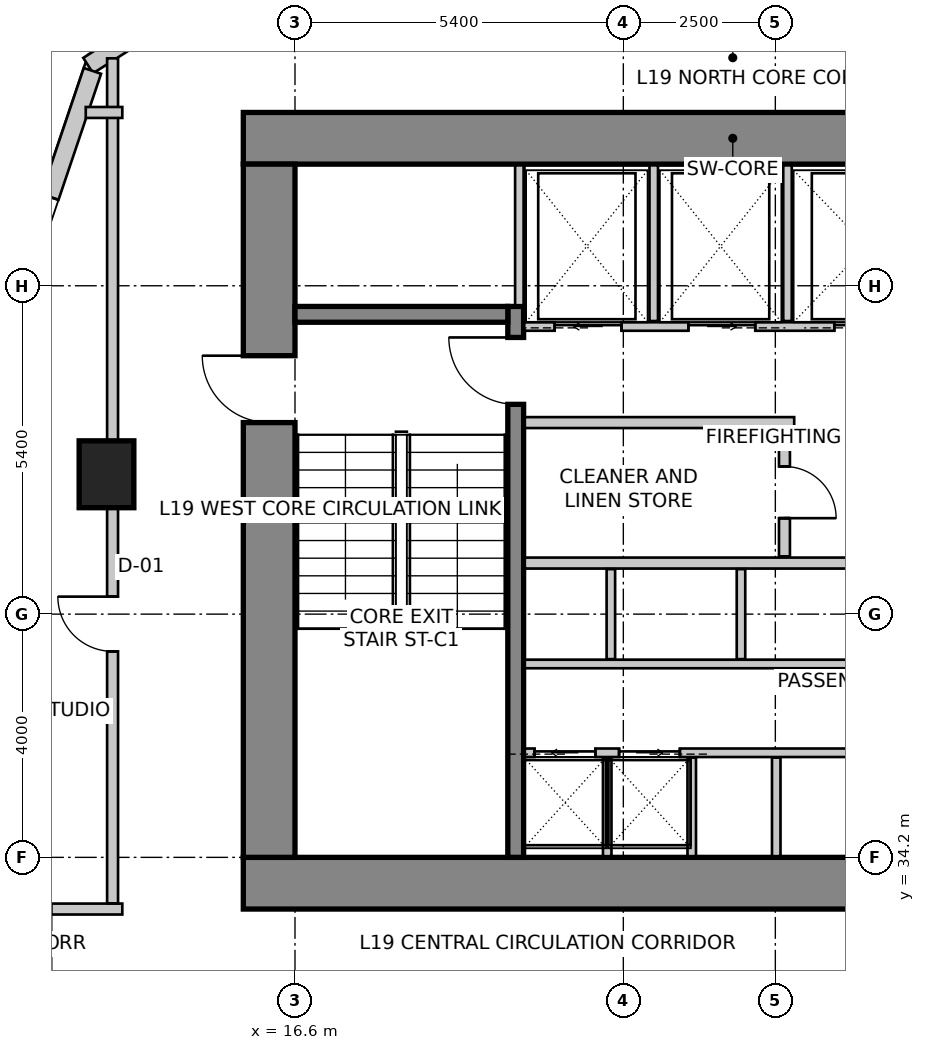
"""IFC4 building model, lengths in metres.
Left out: names, types, materials, properties, quantities, classifications, styles, units other than length and angle.
Written with IfcOpenShell. Run it as: python <this file> out.ifc"""

import sys

from ifc_helpers import new_model, si_unit, direction, frame, frame_2d, origin, origin_2d, place, context, subcontext, project, spatial, rectangle, extrude, source, transform, mapped, element, fill, save


model = new_model("IFC4")
c1 = context("Model", 3, precision=1e-05, world=origin(), true_north=direction((0.0, 1.0)))
c2 = subcontext(c1, "Body", "Model", "MODEL_VIEW")
j1 = project(units=[si_unit("LENGTHUNIT", "METRE"), si_unit("PLANEANGLEUNIT", "RADIAN")], contexts=[c1])
p1 = place(None, origin())
s1 = spatial("IfcSite", under=j1, at=p1, CompositionType="ELEMENT")
p2 = place(p1, origin())
s2 = spatial("IfcBuilding", under=s1, at=p2, CompositionType="ELEMENT")
p3 = place(p2, frame((0.0, 0.0, 79.0)))
s3 = spatial("IfcBuildingStorey", under=s2, at=p3, CompositionType="ELEMENT", Elevation=79.0)
p4 = place(p3, frame((15.75, 46.025, 0.0), z_axis=(0.0, 0.0, 1.0), x_axis=(1.0, 0.0, 0.0)))
e1 = element("IfcWall", 1, at=p4, inside=s3, PredefinedType="SHEAR", context=c2, shape_type="SweptSolid", body=[
    extrude(rectangle(XDim=16.1, YDim=0.85, at=frame_2d((8.05, 0.0))), origin(), (0.0, 0.0, 1.0), 4.0),
])
p5 = place(p3, frame((15.75, 33.775, 0.0), z_axis=(0.0, 0.0, 1.0), x_axis=(1.0, 0.0, 0.0)))
e2 = element("IfcWall", 2, at=p5, inside=s3, PredefinedType="SHEAR", context=c2, shape_type="SweptSolid", body=[
    extrude(rectangle(XDim=16.1, YDim=0.85, at=frame_2d((8.05, 0.0))), origin(), (0.0, 0.0, 1.0), 4.0),
])
m1 = source(origin(), c2, "Body", "SweptSolid", [
    extrude(rectangle(XDim=1.3, YDim=2.15, at=frame_2d((0.65, 1.075))), frame((0.0, 0.435, 0.0), z_axis=(0.0, -1.0, 0.0), x_axis=(1.0, 0.0, 0.0)), (0.0, 0.0, 1.0), 0.87),
])
p6 = place(p5, frame((10.18, 0.0, 0.0)))
e3 = element("IfcOpeningElement", 3, at=p6, cuts=e2, PredefinedType="OPENING", context=c2, shape_type="MappedRepresentation", body=[
    mapped(m1, transform((0.0, 0.0, 0.0), scale=1.0)),
])
p7 = place(p3, frame((16.175, 34.2, 0.0), z_axis=(0.0, 0.0, 1.0), x_axis=(0.0, 1.0, 0.0)))
e4 = element("IfcWall", 4, at=p7, inside=s3, PredefinedType="SHEAR", context=c2, shape_type="SweptSolid", body=[
    extrude(rectangle(XDim=11.4, YDim=0.85, at=frame_2d((5.7, 0.0))), origin(), (0.0, 0.0, 1.0), 4.0),
])
m2 = source(origin(), c2, "Body", "SweptSolid", [
    extrude(rectangle(XDim=1.1, YDim=2.15, at=frame_2d((0.55, 1.075))), frame((0.0, 0.435, 0.0), z_axis=(0.0, -1.0, 0.0), x_axis=(1.0, 0.0, 0.0)), (0.0, 0.0, 1.0), 0.87),
])
p8 = place(p7, frame((7.15, 0.0, 0.0)))
e5 = element("IfcOpeningElement", 5, at=p8, cuts=e4, PredefinedType="OPENING", context=c2, shape_type="MappedRepresentation", body=[
    mapped(m2, transform((0.0, 0.0, 0.0), scale=1.0)),
])
p9 = place(p3, frame((20.23, 34.2, 0.0), z_axis=(0.0, 0.0, 1.0), x_axis=(0.0, 1.0, 0.0)))
e6 = element("IfcWall", 6, at=p9, inside=s3, PredefinedType="SHEAR", context=c2, shape_type="SweptSolid", body=[
    extrude(rectangle(XDim=9.06, YDim=0.26, at=frame_2d((4.53, 0.0))), origin(), (0.0, 0.0, 1.0), 4.0),
])
m3 = source(origin(), c2, "Body", "SweptSolid", [
    extrude(rectangle(XDim=1.1, YDim=2.15, at=frame_2d((0.55, 1.075))), frame((0.0, 0.14, 0.0), z_axis=(0.0, -1.0, 0.0), x_axis=(1.0, 0.0, 0.0)), (0.0, 0.0, 1.0), 0.28),
])
p10 = place(p9, frame((7.45, 0.0, 0.0)))
e7 = element("IfcOpeningElement", 7, at=p10, cuts=e6, PredefinedType="OPENING", context=c2, shape_type="MappedRepresentation", body=[
    mapped(m3, transform((0.0, 0.0, 0.0), scale=1.0)),
])
p11 = place(p3, frame((16.6, 43.13, 0.0), z_axis=(0.0, 0.0, 1.0), x_axis=(1.0, 0.0, 0.0)))
e8 = element("IfcWall", 8, at=p11, inside=s3, PredefinedType="SHEAR", context=c2, shape_type="SweptSolid", body=[
    extrude(rectangle(XDim=3.5, YDim=0.26, at=frame_2d((1.75, 0.0))), origin(), (0.0, 0.0, 1.0), 4.0),
])
m4 = source(origin(), c2, "Body", "SweptSolid", [
    extrude(rectangle(XDim=0.9, YDim=1.1, at=origin_2d()), origin(), (0.0, 0.0, 1.0), 4.0),
])
p12 = place(p3, frame((13.5, 40.5, 0.0), z_axis=(0.0, 0.0, 1.0), x_axis=(1.0, 0.0, 0.0)))
e9 = element("IfcColumn", 9, at=p12, inside=s3, PredefinedType="COLUMN", context=c2, shape_type="MappedRepresentation", body=[
    mapped(m4, transform((0.0, 0.0, 0.0), scale=1.0)),
])
p13 = place(p3, frame((53.961, 47.417, 0.0), z_axis=(0.0, 0.0, 1.0), x_axis=(-0.985865713455, 0.167537443678, 0.0)))
e10 = element("IfcWall", 10, at=p13, inside=s3, PredefinedType="SOLIDWALL", context=c2, shape_type="SweptSolid", body=[
    extrude(rectangle(XDim=32.537, YDim=0.3, at=frame_2d((16.269, 0.0))), origin(), (0.0, 0.0, 1.0), 3.75),
])
m5 = source(origin(), c2, "Body", "SweptSolid", [
    extrude(rectangle(XDim=2.1, YDim=2.0, at=frame_2d((1.05, 1.0))), frame((0.0, 0.16, 0.0), z_axis=(0.0, -1.0, 0.0), x_axis=(1.0, 0.0, 0.0)), (0.0, 0.0, 1.0), 0.32),
])
p14 = place(p13, frame((0.525, 0.0, 0.85)))
e11 = element("IfcOpeningElement", 11, at=p14, cuts=e10, PredefinedType="OPENING", context=c2, shape_type="MappedRepresentation", body=[
    mapped(m5, transform((0.0, 0.0, 0.0), scale=1.0)),
])
m6 = source(origin(), c2, "Body", "SweptSolid", [
    extrude(rectangle(XDim=2.4, YDim=2.2, at=frame_2d((1.2, 1.1))), frame((0.0, 0.16, 0.0), z_axis=(0.0, -1.0, 0.0), x_axis=(1.0, 0.0, 0.0)), (0.0, 0.0, 1.0), 0.32),
])
p15 = place(p13, frame((4.022, 0.0, 0.85)))
e12 = element("IfcOpeningElement", 12, at=p15, cuts=e10, PredefinedType="OPENING", context=c2, shape_type="MappedRepresentation", body=[
    mapped(m6, transform((0.0, 0.0, 0.0), scale=1.0)),
])
p16 = place(p13, frame((8.368, 0.0, 0.85)))
e13 = element("IfcOpeningElement", 13, at=p16, cuts=e10, PredefinedType="OPENING", context=c2, shape_type="MappedRepresentation", body=[
    mapped(m6, transform((0.0, 0.0, 0.0), scale=1.0)),
])
p17 = place(p13, frame((12.713, 0.0, 0.85)))
e14 = element("IfcOpeningElement", 14, at=p17, cuts=e10, PredefinedType="OPENING", context=c2, shape_type="MappedRepresentation", body=[
    mapped(m6, transform((0.0, 0.0, 0.0), scale=1.0)),
])
p18 = place(p13, frame((18.56, 0.0, 0.85)))
e15 = element("IfcOpeningElement", 15, at=p18, cuts=e10, PredefinedType="OPENING", context=c2, shape_type="MappedRepresentation", body=[
    mapped(m6, transform((0.0, 0.0, 0.0), scale=1.0)),
])
p19 = place(p13, frame((25.095, 0.0, 0.85)))
e16 = element("IfcOpeningElement", 16, at=p19, cuts=e10, PredefinedType="OPENING", context=c2, shape_type="MappedRepresentation", body=[
    mapped(m6, transform((0.0, 0.0, 0.0), scale=1.0)),
])
p20 = place(p13, frame((29.595, 0.0, 0.85)))
e17 = element("IfcOpeningElement", 17, at=p20, cuts=e10, PredefinedType="OPENING", context=c2, shape_type="MappedRepresentation", body=[
    mapped(m6, transform((0.0, 0.0, 0.0), scale=1.0)),
])
p21 = place(p3, frame((21.875, 52.742, 0.0), z_axis=(0.0, 0.0, 1.0), x_axis=(-0.843662465249, -0.536873956092, 0.0)))
e18 = element("IfcWall", 18, at=p21, inside=s3, PredefinedType="SOLIDWALL", context=c2, shape_type="SweptSolid", body=[
    extrude(rectangle(XDim=10.284, YDim=0.3, at=frame_2d((5.142, 0.0))), origin(), (0.0, 0.0, 1.0), 3.75),
])
m7 = source(origin(), c2, "Body", "SweptSolid", [
    extrude(rectangle(XDim=1.2, YDim=1.6, at=frame_2d((0.6, 0.8))), frame((0.0, 0.16, 0.0), z_axis=(0.0, -1.0, 0.0), x_axis=(1.0, 0.0, 0.0)), (0.0, 0.0, 1.0), 0.32),
])
p22 = place(p21, frame((0.479, 0.0, 0.85)))
e19 = element("IfcOpeningElement", 19, at=p22, cuts=e18, PredefinedType="OPENING", context=c2, shape_type="MappedRepresentation", body=[
    mapped(m7, transform((0.0, 0.0, 0.0), scale=1.0)),
])
m8 = source(origin(), c2, "Body", "SweptSolid", [
    extrude(rectangle(XDim=2.8, YDim=2.4, at=frame_2d((1.4, 1.2))), frame((0.0, 0.16, 0.0), z_axis=(0.0, -1.0, 0.0), x_axis=(1.0, 0.0, 0.0)), (0.0, 0.0, 1.0), 0.32),
])
p23 = place(p21, frame((3.342, 0.0, 0.85)))
e20 = element("IfcOpeningElement", 20, at=p23, cuts=e18, PredefinedType="OPENING", context=c2, shape_type="MappedRepresentation", body=[
    mapped(m8, transform((0.0, 0.0, 0.0), scale=1.0)),
])
m9 = source(origin(), c2, "Body", "SweptSolid", [
    extrude(rectangle(XDim=1.8, YDim=2.1, at=frame_2d((0.9, 1.05))), frame((0.0, 0.16, 0.0), z_axis=(0.0, -1.0, 0.0), x_axis=(1.0, 0.0, 0.0)), (0.0, 0.0, 1.0), 0.32),
])
p24 = place(p21, frame((7.753, 0.0, 0.85)))
e21 = element("IfcOpeningElement", 21, at=p24, cuts=e18, PredefinedType="OPENING", context=c2, shape_type="MappedRepresentation", body=[
    mapped(m9, transform((0.0, 0.0, 0.0), scale=1.0)),
])
p25 = place(p3, frame((13.269, 47.134, 0.0), z_axis=(0.0, 0.0, 1.0), x_axis=(-0.319920423265, -0.947444416722, 0.0)))
e22 = element("IfcWall", 22, at=p25, inside=s3, PredefinedType="SOLIDWALL", context=c2, shape_type="SweptSolid", body=[
    extrude(rectangle(XDim=16.135, YDim=0.3, at=frame_2d((8.067, 0.0))), origin(), (0.0, 0.0, 1.0), 3.75),
])
p26 = place(p25, frame((2.188, 0.0, 0.85)))
e23 = element("IfcOpeningElement", 23, at=p26, cuts=e22, PredefinedType="OPENING", context=c2, shape_type="MappedRepresentation", body=[
    mapped(m6, transform((0.0, 0.0, 0.0), scale=1.0)),
])
p27 = place(p25, frame((6.959, 0.0, 0.85)))
e24 = element("IfcOpeningElement", 24, at=p27, cuts=e22, PredefinedType="OPENING", context=c2, shape_type="MappedRepresentation", body=[
    mapped(m8, transform((0.0, 0.0, 0.0), scale=1.0)),
])
p28 = place(p25, frame((12.13, 0.0, 0.85)))
e25 = element("IfcOpeningElement", 25, at=p28, cuts=e22, PredefinedType="OPENING", context=c2, shape_type="MappedRepresentation", body=[
    mapped(m6, transform((0.0, 0.0, 0.0), scale=1.0)),
])
p29 = place(p3, frame((20.37, 42.93, 0.0), z_axis=(0.0, 0.0, 1.0), x_axis=(1.0, 0.0, 0.0)))
e26 = element("IfcWall", 26, at=p29, inside=s3, PredefinedType="SOLIDWALL", context=c2, shape_type="SweptSolid", body=[
    extrude(rectangle(XDim=6.86, YDim=0.14, at=frame_2d((3.43, 0.0))), origin(), (0.0, 0.0, 1.0), 3.75),
])
m10 = source(origin(), c2, "Body", "SweptSolid", [
    extrude(rectangle(XDim=1.1, YDim=2.15, at=frame_2d((0.55, 1.075))), frame((0.0, 0.08, 0.0), z_axis=(0.0, -1.0, 0.0), x_axis=(1.0, 0.0, 0.0)), (0.0, 0.0, 1.0), 0.16),
])
p30 = place(p29, frame((0.5, 0.0, 0.0)))
e27 = element("IfcOpeningElement", 27, at=p30, cuts=e26, PredefinedType="OPENING", context=c2, shape_type="MappedRepresentation", body=[
    mapped(m10, transform((0.0, 0.0, 0.0), scale=1.0)),
])
p31 = place(p29, frame((2.7, 0.0, 0.0)))
e28 = element("IfcOpeningElement", 28, at=p31, cuts=e26, PredefinedType="OPENING", context=c2, shape_type="MappedRepresentation", body=[
    mapped(m10, transform((0.0, 0.0, 0.0), scale=1.0)),
])
p32 = place(p29, frame((5.1, 0.0, 0.0)))
e29 = element("IfcOpeningElement", 29, at=p32, cuts=e26, PredefinedType="OPENING", context=c2, shape_type="MappedRepresentation", body=[
    mapped(m10, transform((0.0, 0.0, 0.0), scale=1.0)),
])
p33 = place(p3, frame((20.29, 43.28, 0.0), z_axis=(0.0, 0.0, 1.0), x_axis=(0.0, 1.0, 0.0)))
e30 = element("IfcWall", 30, at=p33, inside=s3, PredefinedType="SOLIDWALL", context=c2, shape_type="SweptSolid", body=[
    extrude(rectangle(XDim=2.3, YDim=0.14, at=frame_2d((1.15, 0.0))), origin(), (0.0, 0.0, 1.0), 3.75),
])
for number, where, z_axis, x_axis in (
    (31, (22.5, 43.02, 0.0), (0.0, 0.0, 1.0), (0.0, 1.0, 0.0)),
    (32, (24.7, 43.02, 0.0), (0.0, 0.0, 1.0), (0.0, 1.0, 0.0)),
):
    element("IfcWall", number, at=place(p3, frame(where, z_axis=z_axis, x_axis=x_axis)), inside=s3, PredefinedType="SOLIDWALL", context=c2, shape_type="SweptSolid", body=[
        extrude(rectangle(XDim=2.56, YDim=0.14, at=frame_2d((1.28, 0.0))), origin(), (0.0, 0.0, 1.0), 3.75),
    ])
p34 = place(p3, frame((20.38, 35.92, 0.0), z_axis=(0.0, 0.0, 1.0), x_axis=(1.0, 0.0, 0.0)))
e33 = element("IfcWall", 33, at=p34, inside=s3, PredefinedType="SOLIDWALL", context=c2, shape_type="SweptSolid", body=[
    extrude(rectangle(XDim=5.65, YDim=0.14, at=frame_2d((2.825, 0.0))), origin(), (0.0, 0.0, 1.0), 3.75),
])
m11 = source(origin(), c2, "Body", "SweptSolid", [
    extrude(rectangle(XDim=1.0, YDim=2.15, at=frame_2d((0.5, 1.075))), frame((0.0, 0.08, 0.0), z_axis=(0.0, -1.0, 0.0), x_axis=(1.0, 0.0, 0.0)), (0.0, 0.0, 1.0), 0.16),
])
p35 = place(p34, frame((0.16, 0.0, 0.0)))
e34 = element("IfcOpeningElement", 34, at=p35, cuts=e33, PredefinedType="OPENING", context=c2, shape_type="MappedRepresentation", body=[
    mapped(m11, transform((0.0, 0.0, 0.0), scale=1.0)),
])
p36 = place(p34, frame((1.55, 0.0, 0.0)))
e35 = element("IfcOpeningElement", 35, at=p36, cuts=e33, PredefinedType="OPENING", context=c2, shape_type="MappedRepresentation", body=[
    mapped(m11, transform((0.0, 0.0, 0.0), scale=1.0)),
])
for number, where, z_axis, x_axis in (
    (36, (21.735, 34.22, 0.0), (0.0, 0.0, 1.0), (0.0, 1.0, 0.0)),
    (37, (23.125, 34.22, 0.0), (0.0, 0.0, 1.0), (0.0, 1.0, 0.0)),
    (38, (24.515, 34.22, 0.0), (0.0, 0.0, 1.0), (0.0, 1.0, 0.0)),
):
    element("IfcWall", number, at=place(p3, frame(where, z_axis=z_axis, x_axis=x_axis)), inside=s3, PredefinedType="SOLIDWALL", context=c2, shape_type="SweptSolid", body=[
        extrude(rectangle(XDim=1.62, YDim=0.14, at=frame_2d((0.81, 0.0))), origin(), (0.0, 0.0, 1.0), 3.042),
    ])
p37 = place(p3, frame((20.38, 37.38, 0.0), z_axis=(0.0, 0.0, 1.0), x_axis=(1.0, 0.0, 0.0)))
e39 = element("IfcWall", 39, at=p37, inside=s3, PredefinedType="SOLIDWALL", context=c2, shape_type="SweptSolid", body=[
    extrude(rectangle(XDim=5.75, YDim=0.14, at=frame_2d((2.875, 0.0))), origin(), (0.0, 0.0, 1.0), 3.75),
])
p38 = place(p3, frame((20.38, 39.04, 0.0), z_axis=(0.0, 0.0, 1.0), x_axis=(1.0, 0.0, 0.0)))
e40 = element("IfcWall", 40, at=p38, inside=s3, PredefinedType="SOLIDWALL", context=c2, shape_type="SweptSolid", body=[
    extrude(rectangle(XDim=5.75, YDim=0.18, at=frame_2d((2.875, 0.0))), origin(), (0.0, 0.0, 1.0), 3.75),
])
for number, where, z_axis, x_axis in (
    (41, (21.795, 37.46, 0.0), (0.0, 0.0, 1.0), (0.0, 1.0, 0.0)),
    (42, (23.935, 37.46, 0.0), (0.0, 0.0, 1.0), (0.0, 1.0, 0.0)),
):
    element("IfcWall", number, at=place(p3, frame(where, z_axis=z_axis, x_axis=x_axis)), inside=s3, PredefinedType="SOLIDWALL", context=c2, shape_type="SweptSolid", body=[
        extrude(rectangle(XDim=1.48, YDim=0.14, at=frame_2d((0.74, 0.0))), origin(), (0.0, 0.0, 1.0), 3.75),
    ])
p39 = place(p3, frame((24.81, 41.35, 0.0), z_axis=(0.0, 0.0, 1.0), x_axis=(-1.0, 0.0, 0.0)))
e43 = element("IfcWall", 43, at=p39, inside=s3, PredefinedType="PARTITIONING", context=c2, shape_type="SweptSolid", body=[
    extrude(rectangle(XDim=4.43, YDim=0.18, at=frame_2d((2.215, 0.0))), origin(), (0.0, 0.0, 1.0), 3.75),
])
p40 = place(p3, frame((24.65, 41.256, 0.0), z_axis=(0.0, 0.0, 1.0), x_axis=(0.0, -1.0, 0.0)))
e44 = element("IfcWall", 44, at=p40, inside=s3, PredefinedType="PARTITIONING", context=c2, shape_type="SweptSolid", body=[
    extrude(rectangle(XDim=2.106, YDim=0.18, at=frame_2d((1.053, 0.0))), origin(), (0.0, 0.0, 1.0), 3.75),
])
m12 = source(origin(), c2, "Body", "SweptSolid", [
    extrude(rectangle(XDim=0.85, YDim=2.15, at=frame_2d((0.425, 1.075))), frame((0.0, 0.1, 0.0), z_axis=(0.0, -1.0, 0.0), x_axis=(1.0, 0.0, 0.0)), (0.0, 0.0, 1.0), 0.2),
])
p41 = place(p40, frame((0.628, 0.0, 0.0)))
e45 = element("IfcOpeningElement", 45, at=p41, cuts=e44, PredefinedType="OPENING", context=c2, shape_type="MappedRepresentation", body=[
    mapped(m12, transform((0.0, 0.0, 0.0), scale=1.0)),
])
p42 = place(p3, frame((12.594, 33.35, 0.0), z_axis=(0.0, 0.0, 1.0), x_axis=(1.0, 0.0, 0.0)))
e46 = element("IfcWall", 46, at=p42, inside=s3, PredefinedType="PARTITIONING", context=c2, shape_type="SweptSolid", body=[
    extrude(rectangle(XDim=1.166, YDim=0.18, at=frame_2d((0.583, 0.0))), origin(), (0.0, 0.0, 1.0), 3.75),
])
p43 = place(p3, frame((13.6, 33.444, 0.0), z_axis=(0.0, 0.0, 1.0), x_axis=(0.0, 1.0, 0.0)))
e47 = element("IfcWall", 47, at=p43, inside=s3, PredefinedType="PARTITIONING", context=c2, shape_type="SweptSolid", body=[
    extrude(rectangle(XDim=13.896, YDim=0.18, at=frame_2d((6.948, 0.0))), origin(), (0.0, 0.0, 1.0), 2.892),
])
m13 = source(origin(), c2, "Body", "SweptSolid", [
    extrude(rectangle(XDim=0.9, YDim=2.15, at=frame_2d((0.45, 1.075))), frame((0.0, 0.1, 0.0), z_axis=(0.0, -1.0, 0.0), x_axis=(1.0, 0.0, 0.0)), (0.0, 0.0, 1.0), 0.2),
])
p44 = place(p43, frame((4.144, 0.0, 0.0)))
e48 = element("IfcOpeningElement", 48, at=p44, cuts=e47, PredefinedType="OPENING", context=c2, shape_type="MappedRepresentation", body=[
    mapped(m13, transform((0.0, 0.0, 0.0), scale=1.0)),
])
p45 = place(p3, frame((13.76, 46.45, 0.0), z_axis=(0.0, 0.0, 1.0), x_axis=(-1.0, 0.0, 0.0)))
e49 = element("IfcWall", 49, at=p45, inside=s3, PredefinedType="PARTITIONING", context=c2, shape_type="SweptSolid", body=[
    extrude(rectangle(XDim=0.601, YDim=0.18, at=frame_2d((0.301, 0.0))), origin(), (0.0, 0.0, 1.0), 3.75),
])
m14 = source(origin(), c2, "Body", "SweptSolid", [
    extrude(rectangle(XDim=1.1, YDim=2.15, at=frame_2d((0.55, 1.075))), frame((0.0, 0.025, 0.0), z_axis=(0.0, -1.0, 0.0), x_axis=(1.0, 0.0, 0.0)), (0.0, 0.0, 1.0), 0.05),
])
p46 = place(p30, origin())
e50 = element("IfcDoor", 50, at=p46, inside=s3, OperationType="SLIDING_TO_LEFT", PredefinedType="DOOR", context=c2, shape_type="MappedRepresentation", body=[
    mapped(m14, transform((0.0, 0.0, 0.0), scale=1.0)),
])
fill(e27, e50)
p47 = place(p31, origin())
e51 = element("IfcDoor", 51, at=p47, inside=s3, OperationType="SLIDING_TO_RIGHT", PredefinedType="DOOR", context=c2, shape_type="MappedRepresentation", body=[
    mapped(m14, transform((0.0, 0.0, 0.0), scale=1.0)),
])
fill(e28, e51)
m15 = source(origin(), c2, "Body", "SweptSolid", [
    extrude(rectangle(XDim=1.1, YDim=2.15, at=frame_2d((0.55, 1.075))), frame((0.0, 0.025, 0.0), z_axis=(0.0, -1.0, 0.0), x_axis=(1.0, 0.0, 0.0)), (0.0, 0.0, 1.0), 0.05),
])
p48 = place(p32, origin())
e52 = element("IfcDoor", 52, at=p48, inside=s3, OperationType="SLIDING_TO_LEFT", PredefinedType="DOOR", context=c2, shape_type="MappedRepresentation", body=[
    mapped(m15, transform((0.0, 0.0, 0.0), scale=1.0)),
])
fill(e29, e52)
m16 = source(origin(), c2, "Body", "SweptSolid", [
    extrude(rectangle(XDim=1.0, YDim=2.15, at=frame_2d((0.5, 1.075))), frame((0.0, 0.025, 0.0), z_axis=(0.0, -1.0, 0.0), x_axis=(1.0, 0.0, 0.0)), (0.0, 0.0, 1.0), 0.05),
])
p49 = place(p35, origin())
e53 = element("IfcDoor", 53, at=p49, inside=s3, OperationType="SLIDING_TO_LEFT", PredefinedType="DOOR", context=c2, shape_type="MappedRepresentation", body=[
    mapped(m16, transform((0.0, 0.0, 0.0), scale=1.0)),
])
fill(e34, e53)
p50 = place(p36, origin())
e54 = element("IfcDoor", 54, at=p50, inside=s3, OperationType="SLIDING_TO_RIGHT", PredefinedType="DOOR", context=c2, shape_type="MappedRepresentation", body=[
    mapped(m16, transform((0.0, 0.0, 0.0), scale=1.0)),
])
fill(e35, e54)
m17 = source(origin(), c2, "Body", "SweptSolid", [
    extrude(rectangle(XDim=1.1, YDim=2.15, at=frame_2d((0.55, 1.075))), frame((0.0, 0.025, 0.0), z_axis=(0.0, -1.0, 0.0), x_axis=(1.0, 0.0, 0.0)), (0.0, 0.0, 1.0), 0.05),
])
p51 = place(p10, origin())
e55 = element("IfcDoor", 55, at=p51, inside=s3, OperationType="SINGLE_SWING_RIGHT", PredefinedType="DOOR", context=c2, shape_type="MappedRepresentation", body=[
    mapped(m17, transform((0.0, 0.0, 0.0), scale=1.0)),
])
fill(e7, e55)
p52 = place(p8, origin())
e56 = element("IfcDoor", 56, at=p52, inside=s3, OperationType="SINGLE_SWING_RIGHT", PredefinedType="DOOR", context=c2, shape_type="MappedRepresentation", body=[
    mapped(m17, transform((0.0, 0.0, 0.0), scale=1.0)),
])
fill(e5, e56)
m18 = source(origin(), c2, "Body", "SweptSolid", [
    extrude(rectangle(XDim=0.85, YDim=2.15, at=frame_2d((0.425, 1.075))), frame((0.0, 0.025, 0.0), z_axis=(0.0, -1.0, 0.0), x_axis=(1.0, 0.0, 0.0)), (0.0, 0.0, 1.0), 0.05),
])
p53 = place(p41, origin())
e57 = element("IfcDoor", 57, at=p53, inside=s3, OperationType="SINGLE_SWING_RIGHT", PredefinedType="DOOR", context=c2, shape_type="MappedRepresentation", body=[
    mapped(m18, transform((0.0, 0.0, 0.0), scale=1.0)),
])
fill(e45, e57)
m19 = source(origin(), c2, "Body", "SweptSolid", [
    extrude(rectangle(XDim=0.9, YDim=2.15, at=frame_2d((0.45, 1.075))), frame((0.0, 0.025, 0.0), z_axis=(0.0, -1.0, 0.0), x_axis=(1.0, 0.0, 0.0)), (0.0, 0.0, 1.0), 0.05),
])
p54 = place(p44, origin())
e58 = element("IfcDoor", 58, at=p54, inside=s3, OperationType="SINGLE_SWING_RIGHT", PredefinedType="DOOR", context=c2, shape_type="MappedRepresentation", body=[
    mapped(m19, transform((0.0, 0.0, 0.0), scale=1.0)),
])
fill(e48, e58)
save(model, sys.argv[1])
